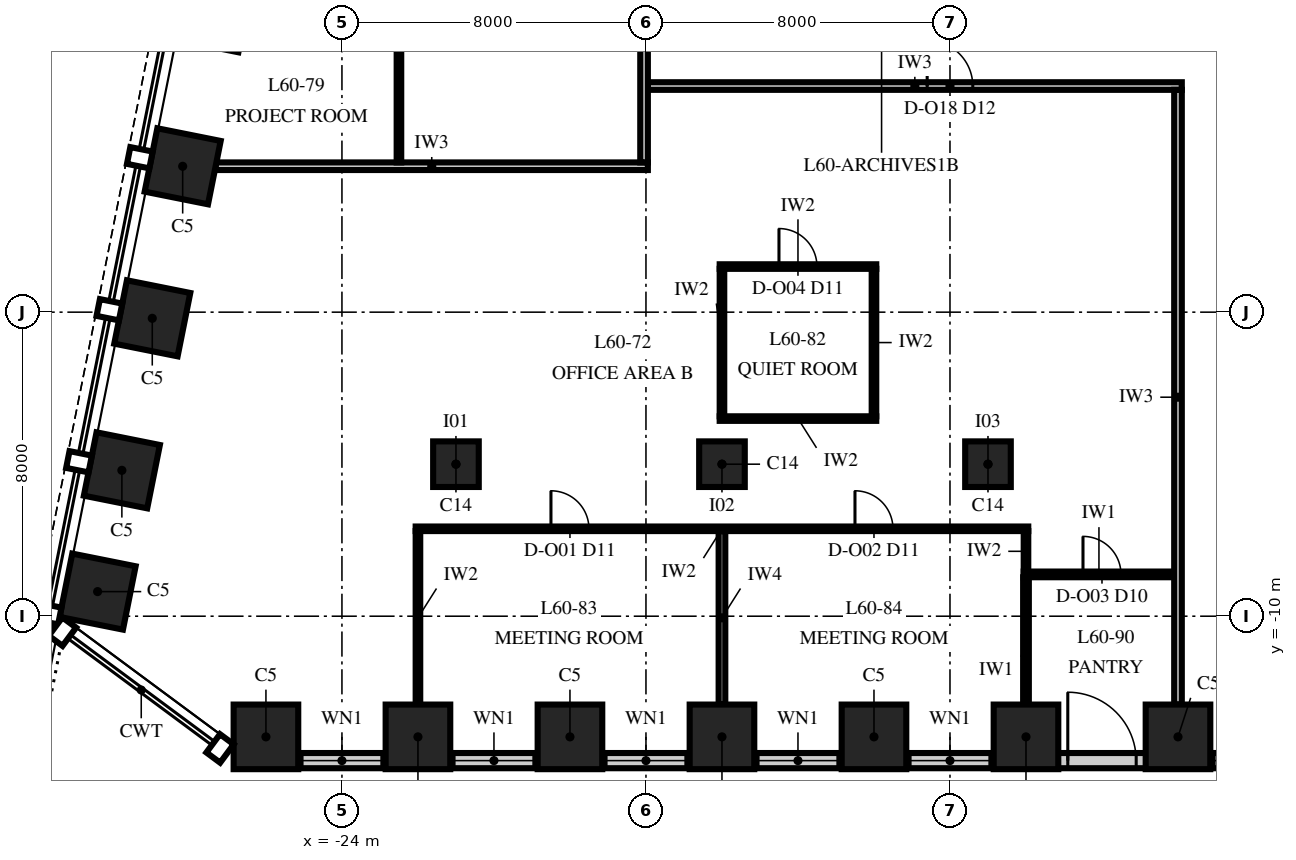
"""IFC4 building model, lengths in metres.
Left out: names, types, materials, properties, quantities, classifications, styles, units other than length and angle.
Written with IfcOpenShell. Run it as: python <this file> out.ifc"""

import sys

from ifc_helpers import new_model, si_unit, direction, frame, frame_2d, origin, origin_2d, place, context, subcontext, project, spatial, rectangle, extrude, element, fill, save


model = new_model("IFC4")
c1 = context("Model", 3, precision=1e-05, world=origin(), true_north=direction((0.0, 1.0)))
c2 = subcontext(c1, "Body", "Model", "MODEL_VIEW")
j1 = project(units=[si_unit("LENGTHUNIT", "METRE"), si_unit("PLANEANGLEUNIT", "RADIAN")], contexts=[c1])
p1 = place(None, origin())
s1 = spatial("IfcSite", under=j1, at=p1, CompositionType="ELEMENT")
p2 = place(p1, origin())
s2 = spatial("IfcBuilding", under=s1, at=p2, CompositionType="ELEMENT")
p3 = place(p2, frame((0.0, 0.0, 260.0)))
s3 = spatial("IfcBuildingStorey", under=s2, at=p3, CompositionType="ELEMENT", Elevation=260.0)
for number, where, z_axis, x_axis in (
    (1, (-26.0, -13.175, -0.25), (0.0, 0.0, 1.0), (1.0, 0.0, 0.0)),
    (2, (-22.0, -13.175, -0.25), (0.0, 0.0, 1.0), (1.0, 0.0, 0.0)),
    (3, (-18.0, -13.175, -0.25), (0.0, 0.0, 1.0), (1.0, 0.0, 0.0)),
    (4, (-14.0, -13.175, -0.25), (0.0, 0.0, 1.0), (1.0, 0.0, 0.0)),
    (5, (-10.0, -13.175, -0.25), (0.0, 0.0, 1.0), (1.0, 0.0, 0.0)),
    (6, (-6.0, -13.175, -0.25), (0.0, 0.0, 1.0), (1.0, 0.0, 0.0)),
    (7, (-2.0, -13.175, -0.25), (0.0, 0.0, 1.0), (1.0, 0.0, 0.0)),
):
    element("IfcColumn", number, at=place(p3, frame(where, z_axis=z_axis, x_axis=x_axis)), inside=s3, PredefinedType="COLUMN", context=c2, shape_type="SweptSolid", body=[
        extrude(rectangle(XDim=1.7, YDim=1.7, at=origin_2d()), origin(), (0.0, 0.0, 1.0), 4.25),
    ])
for number, where, z_axis, x_axis in (
    (8, (-27.391, 5.838, 0.0), (0.0, 0.0, 1.0), (-0.196, -0.981, 0.0)),
    (9, (-28.191, 1.838, 0.0), (0.0, 0.0, 1.0), (-0.196, -0.981, 0.0)),
    (10, (-28.991, -2.162, 0.0), (0.0, 0.0, 1.0), (-0.196, -0.981, 0.0)),
    (11, (-29.791, -6.162, 0.0), (0.0, 0.0, 1.0), (-0.196, -0.981, 0.0)),
    (12, (-30.429, -9.353, 0.0), (0.0, 0.0, 1.0), (-0.196, -0.981, 0.0)),
):
    element("IfcColumn", number, at=place(p3, frame(where, z_axis=z_axis, x_axis=x_axis)), inside=s3, PredefinedType="COLUMN", context=c2, shape_type="SweptSolid", body=[
        extrude(rectangle(XDim=1.7, YDim=1.7, at=origin_2d()), origin(), (0.0, 0.0, 1.0), 4.0),
    ])
for number, where, z_axis, x_axis in (
    (13, (-21.0, -6.0, 0.0), (0.0, 0.0, 1.0), (1.0, 0.0, 0.0)),
    (14, (-14.0, -6.0, 0.0), (0.0, 0.0, 1.0), (1.0, 0.0, 0.0)),
    (15, (-7.0, -6.0, 0.0), (0.0, 0.0, 1.0), (1.0, 0.0, 0.0)),
):
    element("IfcColumn", number, at=place(p3, frame(where, z_axis=z_axis, x_axis=x_axis)), inside=s3, PredefinedType="COLUMN", context=c2, shape_type="SweptSolid", body=[
        extrude(rectangle(XDim=1.2, YDim=1.2, at=origin_2d()), origin(), (0.0, 0.0, 1.0), 4.0),
    ])
p4 = place(p3, frame((-26.0, -13.8, 0.0), z_axis=(0.0, 0.0, 1.0), x_axis=(1.0, 0.0, 0.0)))
e16 = element("IfcWall", 16, at=p4, inside=s3, PredefinedType="SOLIDWALL", context=c2, shape_type="SweptSolid", body=[
    extrude(rectangle(XDim=52.0, YDim=0.4, at=frame_2d((26.0, 0.0))), origin(), (0.0, 0.0, 1.0), 2.0),
])
p5 = place(p4, frame((0.95, 0.0, 0.8)))
e17 = element("IfcOpeningElement", 17, at=p5, cuts=e16, PredefinedType="OPENING", context=c2, shape_type="SweptSolid", body=[
    extrude(rectangle(XDim=2.1, YDim=1.15, at=frame_2d((1.05, 0.575))), frame((0.0, 0.215, 0.0), z_axis=(0.0, -1.0, 0.0), x_axis=(1.0, 0.0, 0.0)), (0.0, 0.0, 1.0), 0.43),
])
p6 = place(p4, frame((4.95, 0.0, 0.8)))
e18 = element("IfcOpeningElement", 18, at=p6, cuts=e16, PredefinedType="OPENING", context=c2, shape_type="SweptSolid", body=[
    extrude(rectangle(XDim=2.1, YDim=1.15, at=frame_2d((1.05, 0.575))), frame((0.0, 0.215, 0.0), z_axis=(0.0, -1.0, 0.0), x_axis=(1.0, 0.0, 0.0)), (0.0, 0.0, 1.0), 0.43),
])
p7 = place(p4, frame((8.95, 0.0, 0.8)))
e19 = element("IfcOpeningElement", 19, at=p7, cuts=e16, PredefinedType="OPENING", context=c2, shape_type="SweptSolid", body=[
    extrude(rectangle(XDim=2.1, YDim=1.15, at=frame_2d((1.05, 0.575))), frame((0.0, 0.215, 0.0), z_axis=(0.0, -1.0, 0.0), x_axis=(1.0, 0.0, 0.0)), (0.0, 0.0, 1.0), 0.43),
])
p8 = place(p4, frame((12.95, 0.0, 0.8)))
e20 = element("IfcOpeningElement", 20, at=p8, cuts=e16, PredefinedType="OPENING", context=c2, shape_type="SweptSolid", body=[
    extrude(rectangle(XDim=2.1, YDim=1.15, at=frame_2d((1.05, 0.575))), frame((0.0, 0.215, 0.0), z_axis=(0.0, -1.0, 0.0), x_axis=(1.0, 0.0, 0.0)), (0.0, 0.0, 1.0), 0.43),
])
p9 = place(p4, frame((16.95, 0.0, 0.8)))
e21 = element("IfcOpeningElement", 21, at=p9, cuts=e16, PredefinedType="OPENING", context=c2, shape_type="SweptSolid", body=[
    extrude(rectangle(XDim=2.1, YDim=1.15, at=frame_2d((1.05, 0.575))), frame((0.0, 0.215, 0.0), z_axis=(0.0, -1.0, 0.0), x_axis=(1.0, 0.0, 0.0)), (0.0, 0.0, 1.0), 0.43),
])
p10 = place(p4, frame((21.1, 0.0, 0.0)))
e22 = element("IfcOpeningElement", 22, at=p10, cuts=e16, PredefinedType="OPENING", context=c2, shape_type="SweptSolid", body=[
    extrude(rectangle(XDim=1.8, YDim=2.0, at=frame_2d((0.9, 1.0))), frame((0.0, 0.215, 0.0), z_axis=(0.0, -1.0, 0.0), x_axis=(1.0, 0.0, 0.0)), (0.0, 0.0, 1.0), 0.43),
])
p11 = place(p4, frame((24.95, 0.0, 0.8)))
e23 = element("IfcOpeningElement", 23, at=p11, cuts=e16, PredefinedType="OPENING", context=c2, shape_type="SweptSolid", body=[
    extrude(rectangle(XDim=2.1, YDim=1.15, at=frame_2d((1.05, 0.575))), frame((0.0, 0.215, 0.0), z_axis=(0.0, -1.0, 0.0), x_axis=(1.0, 0.0, 0.0)), (0.0, 0.0, 1.0), 0.43),
])
p12 = place(p4, frame((29.1, 0.0, 0.0)))
e24 = element("IfcOpeningElement", 24, at=p12, cuts=e16, PredefinedType="OPENING", context=c2, shape_type="SweptSolid", body=[
    extrude(rectangle(XDim=1.8, YDim=2.0, at=frame_2d((0.9, 1.0))), frame((0.0, 0.215, 0.0), z_axis=(0.0, -1.0, 0.0), x_axis=(1.0, 0.0, 0.0)), (0.0, 0.0, 1.0), 0.43),
])
p13 = place(p4, frame((32.95, 0.0, 0.8)))
e25 = element("IfcOpeningElement", 25, at=p13, cuts=e16, PredefinedType="OPENING", context=c2, shape_type="SweptSolid", body=[
    extrude(rectangle(XDim=2.1, YDim=1.15, at=frame_2d((1.05, 0.575))), frame((0.0, 0.215, 0.0), z_axis=(0.0, -1.0, 0.0), x_axis=(1.0, 0.0, 0.0)), (0.0, 0.0, 1.0), 0.43),
])
p14 = place(p4, frame((36.95, 0.0, 0.8)))
e26 = element("IfcOpeningElement", 26, at=p14, cuts=e16, PredefinedType="OPENING", context=c2, shape_type="SweptSolid", body=[
    extrude(rectangle(XDim=2.1, YDim=1.15, at=frame_2d((1.05, 0.575))), frame((0.0, 0.215, 0.0), z_axis=(0.0, -1.0, 0.0), x_axis=(1.0, 0.0, 0.0)), (0.0, 0.0, 1.0), 0.43),
])
p15 = place(p4, frame((40.95, 0.0, 0.8)))
e27 = element("IfcOpeningElement", 27, at=p15, cuts=e16, PredefinedType="OPENING", context=c2, shape_type="SweptSolid", body=[
    extrude(rectangle(XDim=2.1, YDim=1.15, at=frame_2d((1.05, 0.575))), frame((0.0, 0.215, 0.0), z_axis=(0.0, -1.0, 0.0), x_axis=(1.0, 0.0, 0.0)), (0.0, 0.0, 1.0), 0.43),
])
p16 = place(p4, frame((44.95, 0.0, 0.8)))
e28 = element("IfcOpeningElement", 28, at=p16, cuts=e16, PredefinedType="OPENING", context=c2, shape_type="SweptSolid", body=[
    extrude(rectangle(XDim=2.1, YDim=1.15, at=frame_2d((1.05, 0.575))), frame((0.0, 0.215, 0.0), z_axis=(0.0, -1.0, 0.0), x_axis=(1.0, 0.0, 0.0)), (0.0, 0.0, 1.0), 0.43),
])
p17 = place(p4, frame((48.95, 0.0, 0.8)))
e29 = element("IfcOpeningElement", 29, at=p17, cuts=e16, PredefinedType="OPENING", context=c2, shape_type="SweptSolid", body=[
    extrude(rectangle(XDim=2.1, YDim=1.15, at=frame_2d((1.05, 0.575))), frame((0.0, 0.215, 0.0), z_axis=(0.0, -1.0, 0.0), x_axis=(1.0, 0.0, 0.0)), (0.0, 0.0, 1.0), 0.43),
])
p18 = place(p3, frame((-6.06, -8.9, 0.0), z_axis=(0.0, 0.0, 1.0), x_axis=(1.0, 0.0, 0.0)))
e30 = element("IfcWall", 30, at=p18, inside=s3, PredefinedType="PARTITIONING", context=c2, shape_type="SweptSolid", body=[
    extrude(rectangle(XDim=3.96, YDim=0.15, at=frame_2d((1.98, 0.0))), origin(), (0.0, 0.0, 1.0), 3.23),
])
p19 = place(p18, frame((1.56, 0.0, 0.0)))
e31 = element("IfcOpeningElement", 31, at=p19, cuts=e30, PredefinedType="OPENING", context=c2, shape_type="SweptSolid", body=[
    extrude(rectangle(XDim=1.0, YDim=2.3, at=frame_2d((0.5, 1.15))), frame((0.0, 0.09, 0.0), z_axis=(0.0, -1.0, 0.0), x_axis=(1.0, 0.0, 0.0)), (0.0, 0.0, 1.0), 0.18),
])
p20 = place(p3, frame((-22.06, -7.7, 0.0), z_axis=(0.0, 0.0, 1.0), x_axis=(1.0, 0.0, 0.0)))
e32 = element("IfcWall", 32, at=p20, inside=s3, PredefinedType="PARTITIONING", context=c2, shape_type="SweptSolid", body=[
    extrude(rectangle(XDim=16.12, YDim=0.12, at=frame_2d((8.06, 0.0))), origin(), (0.0, 0.0, 1.0), 3.23),
])
p21 = place(p20, frame((3.56, 0.0, 0.0)))
e33 = element("IfcOpeningElement", 33, at=p21, cuts=e32, PredefinedType="OPENING", context=c2, shape_type="SweptSolid", body=[
    extrude(rectangle(XDim=1.0, YDim=2.4, at=frame_2d((0.5, 1.2))), frame((0.0, 0.075, 0.0), z_axis=(0.0, -1.0, 0.0), x_axis=(1.0, 0.0, 0.0)), (0.0, 0.0, 1.0), 0.15),
])
p22 = place(p20, frame((11.56, 0.0, 0.0)))
e34 = element("IfcOpeningElement", 34, at=p22, cuts=e32, PredefinedType="OPENING", context=c2, shape_type="SweptSolid", body=[
    extrude(rectangle(XDim=1.0, YDim=2.4, at=frame_2d((0.5, 1.2))), frame((0.0, 0.075, 0.0), z_axis=(0.0, -1.0, 0.0), x_axis=(1.0, 0.0, 0.0)), (0.0, 0.0, 1.0), 0.15),
])
p23 = place(p3, frame((-14.06, -4.8, 0.0), z_axis=(0.0, 0.0, 1.0), x_axis=(1.0, 0.0, 0.0)))
e35 = element("IfcWall", 35, at=p23, inside=s3, PredefinedType="PARTITIONING", context=c2, shape_type="SweptSolid", body=[
    extrude(rectangle(XDim=4.12, YDim=0.12, at=frame_2d((2.06, 0.0))), origin(), (0.0, 0.0, 1.0), 3.23),
])
p24 = place(p3, frame((-14.06, -0.8, 0.0), z_axis=(0.0, 0.0, 1.0), x_axis=(1.0, 0.0, 0.0)))
e36 = element("IfcWall", 36, at=p24, inside=s3, PredefinedType="PARTITIONING", context=c2, shape_type="SweptSolid", body=[
    extrude(rectangle(XDim=4.12, YDim=0.12, at=frame_2d((2.06, 0.0))), origin(), (0.0, 0.0, 1.0), 3.23),
])
p25 = place(p24, frame((1.56, 0.0, 0.0)))
e37 = element("IfcOpeningElement", 37, at=p25, cuts=e36, PredefinedType="OPENING", context=c2, shape_type="SweptSolid", body=[
    extrude(rectangle(XDim=1.0, YDim=2.4, at=frame_2d((0.5, 1.2))), frame((0.0, 0.075, 0.0), z_axis=(0.0, -1.0, 0.0), x_axis=(1.0, 0.0, 0.0)), (0.0, 0.0, 1.0), 0.15),
])
p26 = place(p3, frame((-27.324, 1.84, 0.0), z_axis=(0.0, 0.0, 1.0), x_axis=(1.0, 0.0, 0.0)))
e38 = element("IfcWall", 38, at=p26, inside=s3, PredefinedType="PARTITIONING", context=c2, shape_type="SweptSolid", body=[
    extrude(rectangle(XDim=11.374, YDim=0.2, at=frame_2d((5.687, 0.0))), origin(), (0.0, 0.0, 1.0), 3.23),
])
p27 = place(p3, frame((-15.95, 3.95, 0.0), z_axis=(0.0, 0.0, 1.0), x_axis=(1.0, 0.0, 0.0)))
e39 = element("IfcWall", 39, at=p27, inside=s3, PredefinedType="PARTITIONING", context=c2, shape_type="SweptSolid", body=[
    extrude(rectangle(XDim=14.05, YDim=0.2, at=frame_2d((7.025, 0.0))), origin(), (0.0, 0.0, 1.0), 3.23),
])
p28 = place(p27, frame((7.35, 0.0, 0.0)))
e40 = element("IfcOpeningElement", 40, at=p28, cuts=e39, PredefinedType="OPENING", context=c2, shape_type="SweptSolid", body=[
    extrude(rectangle(XDim=1.2, YDim=2.4, at=frame_2d((0.6, 1.2))), frame((0.0, 0.115, 0.0), z_axis=(0.0, -1.0, 0.0), x_axis=(1.0, 0.0, 0.0)), (0.0, 0.0, 1.0), 0.23),
])
p29 = place(p3, frame((-22.5, 1.94, 0.0), z_axis=(0.0, 0.0, 1.0), x_axis=(0.0, 1.0, 0.0)))
e41 = element("IfcWall", 41, at=p29, inside=s3, PredefinedType="PARTITIONING", context=c2, shape_type="SweptSolid", body=[
    extrude(rectangle(XDim=7.825, YDim=0.12, at=frame_2d((3.913, 0.0))), origin(), (0.0, 0.0, 1.0), 2.842),
])
p30 = place(p29, frame((3.4, 0.0, 0.0)))
e42 = element("IfcOpeningElement", 42, at=p30, cuts=e41, PredefinedType="OPENING", context=c2, shape_type="SweptSolid", body=[
    extrude(rectangle(XDim=1.0, YDim=2.4, at=frame_2d((0.5, 1.2))), frame((0.0, 0.075, 0.0), z_axis=(0.0, -1.0, 0.0), x_axis=(1.0, 0.0, 0.0)), (0.0, 0.0, 1.0), 0.15),
])
p31 = place(p3, frame((-22.0, -12.325, 0.0), z_axis=(0.0, 0.0, 1.0), x_axis=(0.0, 1.0, 0.0)))
e43 = element("IfcWall", 43, at=p31, inside=s3, PredefinedType="PARTITIONING", context=c2, shape_type="SweptSolid", body=[
    extrude(rectangle(XDim=4.565, YDim=0.12, at=frame_2d((2.282, 0.0))), origin(), (0.0, 0.0, 1.0), 3.23),
])
p32 = place(p3, frame((-16.05, 1.94, 0.0), z_axis=(0.0, 0.0, 1.0), x_axis=(0.0, 1.0, 0.0)))
e44 = element("IfcWall", 44, at=p32, inside=s3, PredefinedType="PARTITIONING", context=c2, shape_type="SweptSolid", body=[
    extrude(rectangle(XDim=24.01, YDim=0.2, at=frame_2d((12.005, 0.0))), origin(), (0.0, 0.0, 1.0), 2.842),
])
p33 = place(p32, frame((8.46, 0.0, 0.0)))
e45 = element("IfcOpeningElement", 45, at=p33, cuts=e44, PredefinedType="OPENING", context=c2, shape_type="SweptSolid", body=[
    extrude(rectangle(XDim=1.2, YDim=2.4, at=frame_2d((0.6, 1.2))), frame((0.0, 0.115, 0.0), z_axis=(0.0, -1.0, 0.0), x_axis=(1.0, 0.0, 0.0)), (0.0, 0.0, 1.0), 0.23),
])
p34 = place(p32, frame((22.46, 0.0, 0.0)))
e46 = element("IfcOpeningElement", 46, at=p34, cuts=e44, PredefinedType="OPENING", context=c2, shape_type="SweptSolid", body=[
    extrude(rectangle(XDim=1.2, YDim=2.4, at=frame_2d((0.6, 1.2))), frame((0.0, 0.115, 0.0), z_axis=(0.0, -1.0, 0.0), x_axis=(1.0, 0.0, 0.0)), (0.0, 0.0, 1.0), 0.23),
])
p35 = place(p3, frame((-14.0, -12.325, 0.0), z_axis=(0.0, 0.0, 1.0), x_axis=(0.0, 1.0, 0.0)))
e47 = element("IfcWall", 47, at=p35, inside=s3, PredefinedType="PARTITIONING", context=c2, shape_type="SweptSolid", body=[
    extrude(rectangle(XDim=4.565, YDim=0.175, at=frame_2d((2.282, 0.0))), origin(), (0.0, 0.0, 1.0), 3.23),
])
for number, where, z_axis, x_axis in (
    (48, (-14.0, -4.74, 0.0), (0.0, 0.0, 1.0), (0.0, 1.0, 0.0)),
    (49, (-10.0, -4.74, 0.0), (0.0, 0.0, 1.0), (0.0, 1.0, 0.0)),
):
    element("IfcWall", number, at=place(p3, frame(where, z_axis=z_axis, x_axis=x_axis)), inside=s3, PredefinedType="PARTITIONING", context=c2, shape_type="SweptSolid", body=[
        extrude(rectangle(XDim=3.88, YDim=0.12, at=frame_2d((1.94, 0.0))), origin(), (0.0, 0.0, 1.0), 3.23),
    ])
p36 = place(p3, frame((-6.0, -12.325, 0.0), z_axis=(0.0, 0.0, 1.0), x_axis=(0.0, 1.0, 0.0)))
e50 = element("IfcWall", 50, at=p36, inside=s3, PredefinedType="PARTITIONING", context=c2, shape_type="SweptSolid", body=[
    extrude(rectangle(XDim=3.35, YDim=0.15, at=frame_2d((1.675, 0.0))), origin(), (0.0, 0.0, 1.0), 3.23),
])
p37 = place(p3, frame((-6.0, -8.825, 0.0), z_axis=(0.0, 0.0, 1.0), x_axis=(0.0, 1.0, 0.0)))
e51 = element("IfcWall", 51, at=p37, inside=s3, PredefinedType="PARTITIONING", context=c2, shape_type="SweptSolid", body=[
    extrude(rectangle(XDim=1.065, YDim=0.12, at=frame_2d((0.532, 0.0))), origin(), (0.0, 0.0, 1.0), 3.23),
])
p38 = place(p3, frame((-2.0, -12.325, 0.0), z_axis=(0.0, 0.0, 1.0), x_axis=(0.0, 1.0, 0.0)))
e52 = element("IfcWall", 52, at=p38, inside=s3, PredefinedType="PARTITIONING", context=c2, shape_type="SweptSolid", body=[
    extrude(rectangle(XDim=16.175, YDim=0.2, at=frame_2d((8.087, 0.0))), origin(), (0.0, 0.0, 1.0), 2.842),
])
p39 = place(p5, origin())
e53 = element("IfcWindow", 53, at=p39, inside=s3, PartitioningType="SINGLE_PANEL", PredefinedType="WINDOW", context=c2, shape_type="SweptSolid", body=[
    extrude(rectangle(XDim=2.1, YDim=1.15, at=frame_2d((1.05, 0.575))), frame((0.0, 0.03, 0.0), z_axis=(0.0, -1.0, 0.0), x_axis=(1.0, 0.0, 0.0)), (0.0, 0.0, 1.0), 0.06),
])
fill(e17, e53)
p40 = place(p6, origin())
e54 = element("IfcWindow", 54, at=p40, inside=s3, PartitioningType="SINGLE_PANEL", PredefinedType="WINDOW", context=c2, shape_type="SweptSolid", body=[
    extrude(rectangle(XDim=2.1, YDim=1.15, at=frame_2d((1.05, 0.575))), frame((0.0, 0.03, 0.0), z_axis=(0.0, -1.0, 0.0), x_axis=(1.0, 0.0, 0.0)), (0.0, 0.0, 1.0), 0.06),
])
fill(e18, e54)
p41 = place(p7, origin())
e55 = element("IfcWindow", 55, at=p41, inside=s3, PartitioningType="SINGLE_PANEL", PredefinedType="WINDOW", context=c2, shape_type="SweptSolid", body=[
    extrude(rectangle(XDim=2.1, YDim=1.15, at=frame_2d((1.05, 0.575))), frame((0.0, 0.03, 0.0), z_axis=(0.0, -1.0, 0.0), x_axis=(1.0, 0.0, 0.0)), (0.0, 0.0, 1.0), 0.06),
])
fill(e19, e55)
p42 = place(p8, origin())
e56 = element("IfcWindow", 56, at=p42, inside=s3, PartitioningType="SINGLE_PANEL", PredefinedType="WINDOW", context=c2, shape_type="SweptSolid", body=[
    extrude(rectangle(XDim=2.1, YDim=1.15, at=frame_2d((1.05, 0.575))), frame((0.0, 0.03, 0.0), z_axis=(0.0, -1.0, 0.0), x_axis=(1.0, 0.0, 0.0)), (0.0, 0.0, 1.0), 0.06),
])
fill(e20, e56)
p43 = place(p9, origin())
e57 = element("IfcWindow", 57, at=p43, inside=s3, PartitioningType="SINGLE_PANEL", PredefinedType="WINDOW", context=c2, shape_type="SweptSolid", body=[
    extrude(rectangle(XDim=2.1, YDim=1.15, at=frame_2d((1.05, 0.575))), frame((0.0, 0.03, 0.0), z_axis=(0.0, -1.0, 0.0), x_axis=(1.0, 0.0, 0.0)), (0.0, 0.0, 1.0), 0.06),
])
fill(e21, e57)
p44 = place(p10, origin())
e58 = element("IfcDoor", 58, at=p44, inside=s3, OperationType="DOUBLE_DOOR_SINGLE_SWING", PredefinedType="DOOR", context=c2, shape_type="SweptSolid", body=[
    extrude(rectangle(XDim=1.8, YDim=2.0, at=frame_2d((0.9, 1.0))), frame((0.0, 0.2, 0.0), z_axis=(0.0, -1.0, 0.0), x_axis=(1.0, 0.0, 0.0)), (0.0, 0.0, 1.0), 0.399),
])
fill(e22, e58)
p45 = place(p11, origin())
e59 = element("IfcWindow", 59, at=p45, inside=s3, PartitioningType="SINGLE_PANEL", PredefinedType="WINDOW", context=c2, shape_type="SweptSolid", body=[
    extrude(rectangle(XDim=2.1, YDim=1.15, at=frame_2d((1.05, 0.575))), frame((0.0, 0.03, 0.0), z_axis=(0.0, -1.0, 0.0), x_axis=(1.0, 0.0, 0.0)), (0.0, 0.0, 1.0), 0.06),
])
fill(e23, e59)
p46 = place(p21, origin())
e60 = element("IfcDoor", 60, at=p46, inside=s3, OperationType="SINGLE_SWING_RIGHT", PredefinedType="DOOR", context=c2, shape_type="SweptSolid", body=[
    extrude(rectangle(XDim=1.0, YDim=2.4, at=frame_2d((0.5, 1.2))), frame((0.0, 0.06, 0.0), z_axis=(0.0, -1.0, 0.0), x_axis=(1.0, 0.0, 0.0)), (0.0, 0.0, 1.0), 0.12),
])
fill(e33, e60)
p47 = place(p22, origin())
e61 = element("IfcDoor", 61, at=p47, inside=s3, OperationType="SINGLE_SWING_RIGHT", PredefinedType="DOOR", context=c2, shape_type="SweptSolid", body=[
    extrude(rectangle(XDim=1.0, YDim=2.4, at=frame_2d((0.5, 1.2))), frame((0.0, 0.06, 0.0), z_axis=(0.0, -1.0, 0.0), x_axis=(1.0, 0.0, 0.0)), (0.0, 0.0, 1.0), 0.12),
])
fill(e34, e61)
p48 = place(p19, origin())
e62 = element("IfcDoor", 62, at=p48, inside=s3, OperationType="SINGLE_SWING_LEFT", PredefinedType="DOOR", context=c2, shape_type="SweptSolid", body=[
    extrude(rectangle(XDim=1.0, YDim=2.3, at=frame_2d((0.5, 1.15))), frame((0.0, 0.075, 0.0), z_axis=(0.0, -1.0, 0.0), x_axis=(1.0, 0.0, 0.0)), (0.0, 0.0, 1.0), 0.149),
])
fill(e31, e62)
p49 = place(p25, origin())
e63 = element("IfcDoor", 63, at=p49, inside=s3, OperationType="SINGLE_SWING_RIGHT", PredefinedType="DOOR", context=c2, shape_type="SweptSolid", body=[
    extrude(rectangle(XDim=1.0, YDim=2.4, at=frame_2d((0.5, 1.2))), frame((0.0, 0.06, 0.0), z_axis=(0.0, -1.0, 0.0), x_axis=(1.0, 0.0, 0.0)), (0.0, 0.0, 1.0), 0.12),
])
fill(e37, e63)
p50 = place(p28, origin())
e64 = element("IfcDoor", 64, at=p50, inside=s3, OperationType="SINGLE_SWING_LEFT", PredefinedType="DOOR", context=c2, shape_type="SweptSolid", body=[
    extrude(rectangle(XDim=1.2, YDim=2.4, at=frame_2d((0.6, 1.2))), frame((0.0, 0.1, 0.0), z_axis=(0.0, -1.0, 0.0), x_axis=(1.0, 0.0, 0.0)), (0.0, 0.0, 1.0), 0.199),
])
fill(e40, e64)
save(model, sys.argv[1])
